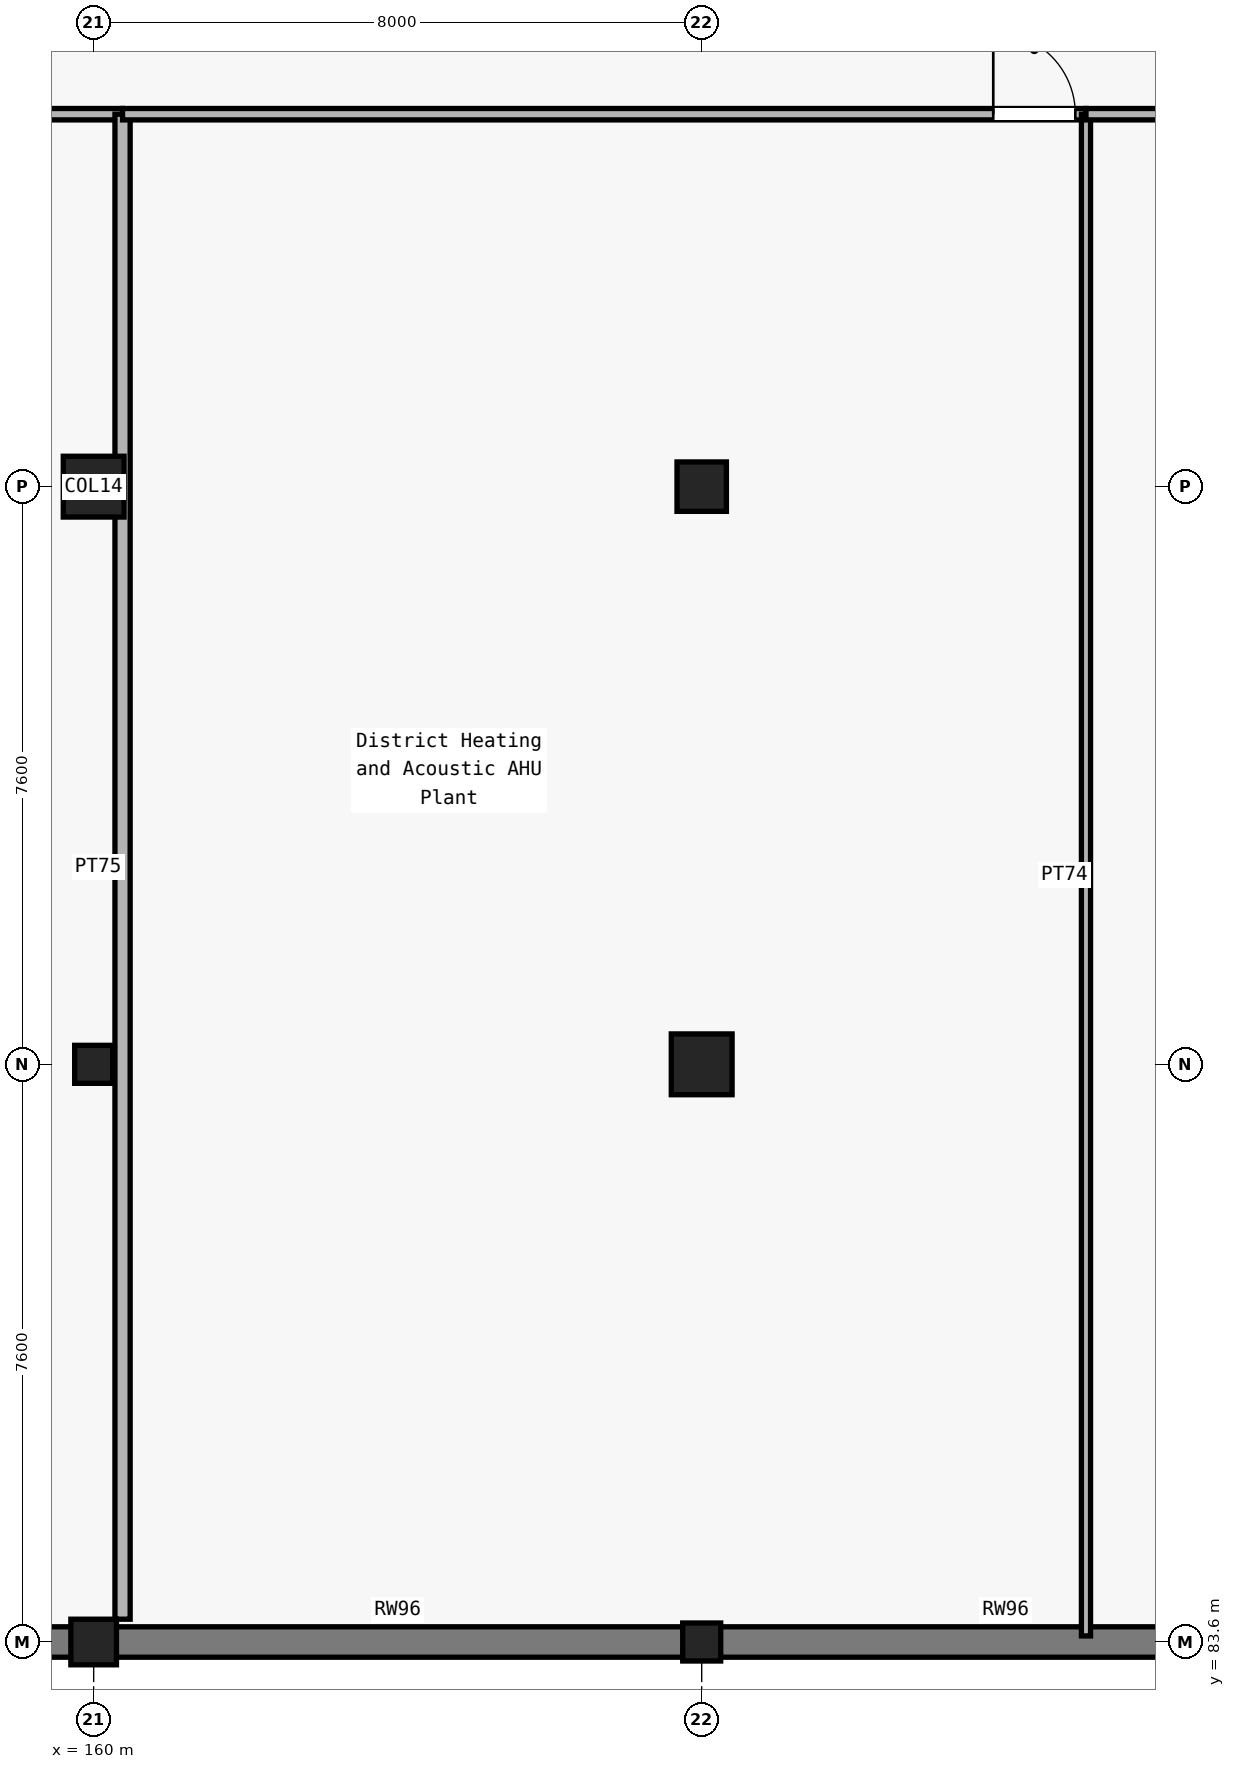
"""IFC4 building model, lengths in metres.
Left out: names, types, materials, properties, quantities, classifications, styles, units other than length and angle.
Written with IfcOpenShell. Run it as: python <this file> out.ifc"""

import sys

from ifc_helpers import new_model, si_unit, direction, frame, frame_2d, origin, origin_2d, place, context, subcontext, project, spatial, rectangle, circle, extrude, element, fill, save


model = new_model("IFC4")
c1 = context("Model", 3, precision=1e-05, world=origin(), true_north=direction((0.0, 1.0)))
c2 = subcontext(c1, "Body", "Model", "MODEL_VIEW")
j1 = project(units=[si_unit("LENGTHUNIT", "METRE"), si_unit("PLANEANGLEUNIT", "RADIAN")], contexts=[c1])
p1 = place(None, origin())
s1 = spatial("IfcSite", under=j1, at=p1, CompositionType="ELEMENT")
p2 = place(p1, origin())
s2 = spatial("IfcBuilding", under=s1, at=p2, CompositionType="ELEMENT")
p3 = place(p2, frame((0.0, 0.0, -5.4)))
s3 = spatial("IfcBuildingStorey", under=s2, at=p3, CompositionType="ELEMENT", Elevation=-5.4)
for number, where, z_axis, x_axis in (
    (1, (152.0, 83.6, 0.0), (0.0, 0.0, 1.0), (1.0, 0.0, 0.0)),
    (2, (160.0, 83.6, 0.0), (0.0, 0.0, 1.0), (1.0, 0.0, 0.0)),
    (3, (168.0, 83.6, 0.0), (0.0, 0.0, 1.0), (1.0, 0.0, 0.0)),
):
    element("IfcWall", number, at=place(p3, frame(where, z_axis=z_axis, x_axis=x_axis)), inside=s3, PredefinedType="USERDEFINED", context=c2, shape_type="SweptSolid", body=[
        extrude(rectangle(XDim=8.0, YDim=0.4, at=frame_2d((4.0, 0.0))), origin(), (0.0, 0.0, 1.0), 5.08),
    ])
p4 = place(p3, frame((160.0, 83.6, 0.0), z_axis=(0.0, 0.0, 1.0), x_axis=(1.0, 0.0, 0.0)))
e4 = element("IfcColumn", 4, at=p4, inside=s3, PredefinedType="COLUMN", context=c2, shape_type="SweptSolid", body=[
    extrude(rectangle(XDim=0.6, YDim=0.6, at=origin_2d()), origin(), (0.0, 0.0, 1.0), 5.4),
])
p5 = place(p3, frame((160.0, 91.2, 0.0), z_axis=(0.0, 0.0, 1.0), x_axis=(1.0, 0.0, 0.0)))
e5 = element("IfcColumn", 5, at=p5, inside=s3, PredefinedType="COLUMN", context=c2, shape_type="SweptSolid", body=[
    extrude(rectangle(XDim=0.5, YDim=0.5, at=origin_2d()), origin(), (0.0, 0.0, 1.0), 5.4),
])
p6 = place(p3, frame((160.0, 98.8, 0.0), z_axis=(0.0, 0.0, 1.0), x_axis=(1.0, 0.0, 0.0)))
e6 = element("IfcColumn", 6, at=p6, inside=s3, PredefinedType="COLUMN", context=c2, shape_type="SweptSolid", body=[
    extrude(circle(Radius=0.4, at=origin_2d()), origin(), (0.0, 0.0, 1.0), 5.4),
])
p7 = place(p3, frame((168.0, 83.6, 0.0), z_axis=(0.0, 0.0, 1.0), x_axis=(1.0, 0.0, 0.0)))
e7 = element("IfcColumn", 7, at=p7, inside=s3, PredefinedType="COLUMN", context=c2, shape_type="SweptSolid", body=[
    extrude(rectangle(XDim=0.5, YDim=0.5, at=origin_2d()), origin(), (0.0, 0.0, 1.0), 5.4),
])
p8 = place(p3, frame((168.0, 91.2, 0.0), z_axis=(0.0, 0.0, 1.0), x_axis=(1.0, 0.0, 0.0)))
e8 = element("IfcColumn", 8, at=p8, inside=s3, PredefinedType="COLUMN", context=c2, shape_type="SweptSolid", body=[
    extrude(circle(Radius=0.4, at=origin_2d()), origin(), (0.0, 0.0, 1.0), 5.4),
])
p9 = place(p3, frame((168.0, 98.8, 0.0), z_axis=(0.0, 0.0, 1.0), x_axis=(1.0, 0.0, 0.0)))
e9 = element("IfcColumn", 9, at=p9, inside=s3, PredefinedType="COLUMN", context=c2, shape_type="SweptSolid", body=[
    extrude(circle(Radius=0.325, at=origin_2d()), origin(), (0.0, 0.0, 1.0), 5.4),
])
p10 = place(p3, frame((149.515, 103.7, 0.0), z_axis=(0.0, 0.0, 1.0), x_axis=(1.0, 0.0, 0.0)))
e10 = element("IfcWall", 10, at=p10, inside=s3, PredefinedType="PARTITIONING", context=c2, shape_type="SweptSolid", body=[
    extrude(rectangle(XDim=10.865, YDim=0.15, at=frame_2d((5.433, 0.0))), origin(), (0.0, 0.0, 1.0), 4.255),
])
p11 = place(p10, frame((5.875, 0.0, 0.0)))
e11 = element("IfcOpeningElement", 11, at=p11, cuts=e10, PredefinedType="OPENING", context=c2, shape_type="SweptSolid", body=[
    extrude(rectangle(XDim=1.02, YDim=2.1, at=frame_2d((0.51, 1.05))), frame((0.0, 0.085, 0.0), z_axis=(0.0, -1.0, 0.0), x_axis=(1.0, 0.0, 0.0)), (0.0, 0.0, 1.0), 0.17),
])
p12 = place(p3, frame((160.38, 83.9, 0.0), z_axis=(0.0, 0.0, 1.0), x_axis=(0.0, 1.0, 0.0)))
e12 = element("IfcWall", 12, at=p12, inside=s3, PredefinedType="PARTITIONING", context=c2, shape_type="SweptSolid", body=[
    extrude(rectangle(XDim=19.8, YDim=0.2, at=frame_2d((9.9, 0.0))), origin(), (0.0, 0.0, 1.0), 4.255),
])
p13 = place(p3, frame((160.38, 103.7, 0.0), z_axis=(0.0, 0.0, 1.0), x_axis=(1.0, 0.0, 0.0)))
e13 = element("IfcWall", 13, at=p13, inside=s3, PredefinedType="PARTITIONING", context=c2, shape_type="SweptSolid", body=[
    extrude(rectangle(XDim=12.676, YDim=0.15, at=frame_2d((6.338, 0.0))), origin(), (0.0, 0.0, 1.0), 4.405),
])
p14 = place(p13, frame((11.456, 0.0, 0.0)))
e14 = element("IfcOpeningElement", 14, at=p14, cuts=e13, PredefinedType="OPENING", context=c2, shape_type="SweptSolid", body=[
    extrude(rectangle(XDim=1.08, YDim=2.1, at=frame_2d((0.54, 1.05))), frame((0.0, 0.085, 0.0), z_axis=(0.0, -1.0, 0.0), x_axis=(1.0, 0.0, 0.0)), (0.0, 0.0, 1.0), 0.17),
])
p15 = place(p3, frame((173.056, 83.68, 0.0), z_axis=(0.0, 0.0, 1.0), x_axis=(0.0, 1.0, 0.0)))
e15 = element("IfcWall", 15, at=p15, inside=s3, PredefinedType="PARTITIONING", context=c2, shape_type="SweptSolid", body=[
    extrude(rectangle(XDim=20.02, YDim=0.12, at=frame_2d((10.01, 0.0))), origin(), (0.0, 0.0, 1.0), 4.255),
])
p16 = place(p3, frame((173.056, 103.7, 0.0), z_axis=(0.0, 0.0, 1.0), x_axis=(1.0, 0.0, 0.0)))
e16 = element("IfcWall", 16, at=p16, inside=s3, PredefinedType="PARTITIONING", context=c2, shape_type="SweptSolid", body=[
    extrude(rectangle(XDim=10.864, YDim=0.15, at=frame_2d((5.432, 0.0))), origin(), (0.0, 0.0, 1.0), 4.33),
])
p17 = place(p16, frame((6.817, 0.0, 0.0)))
e17 = element("IfcOpeningElement", 17, at=p17, cuts=e16, PredefinedType="OPENING", context=c2, shape_type="SweptSolid", body=[
    extrude(rectangle(XDim=0.92, YDim=2.15, at=frame_2d((0.46, 1.075))), frame((0.0, 0.085, 0.0), z_axis=(0.0, -1.0, 0.0), x_axis=(1.0, 0.0, 0.0)), (0.0, 0.0, 1.0), 0.17),
])
p18 = place(p14, origin())
e18 = element("IfcDoor", 18, at=p18, inside=s3, OperationType="SINGLE_SWING_LEFT", PredefinedType="DOOR", context=c2, shape_type="SweptSolid", body=[
    extrude(rectangle(XDim=1.08, YDim=2.1, at=frame_2d((0.54, 1.05))), frame((0.0, 0.025, 0.0), z_axis=(0.0, -1.0, 0.0), x_axis=(1.0, 0.0, 0.0)), (0.0, 0.0, 1.0), 0.05),
])
fill(e14, e18)
save(model, sys.argv[1])
